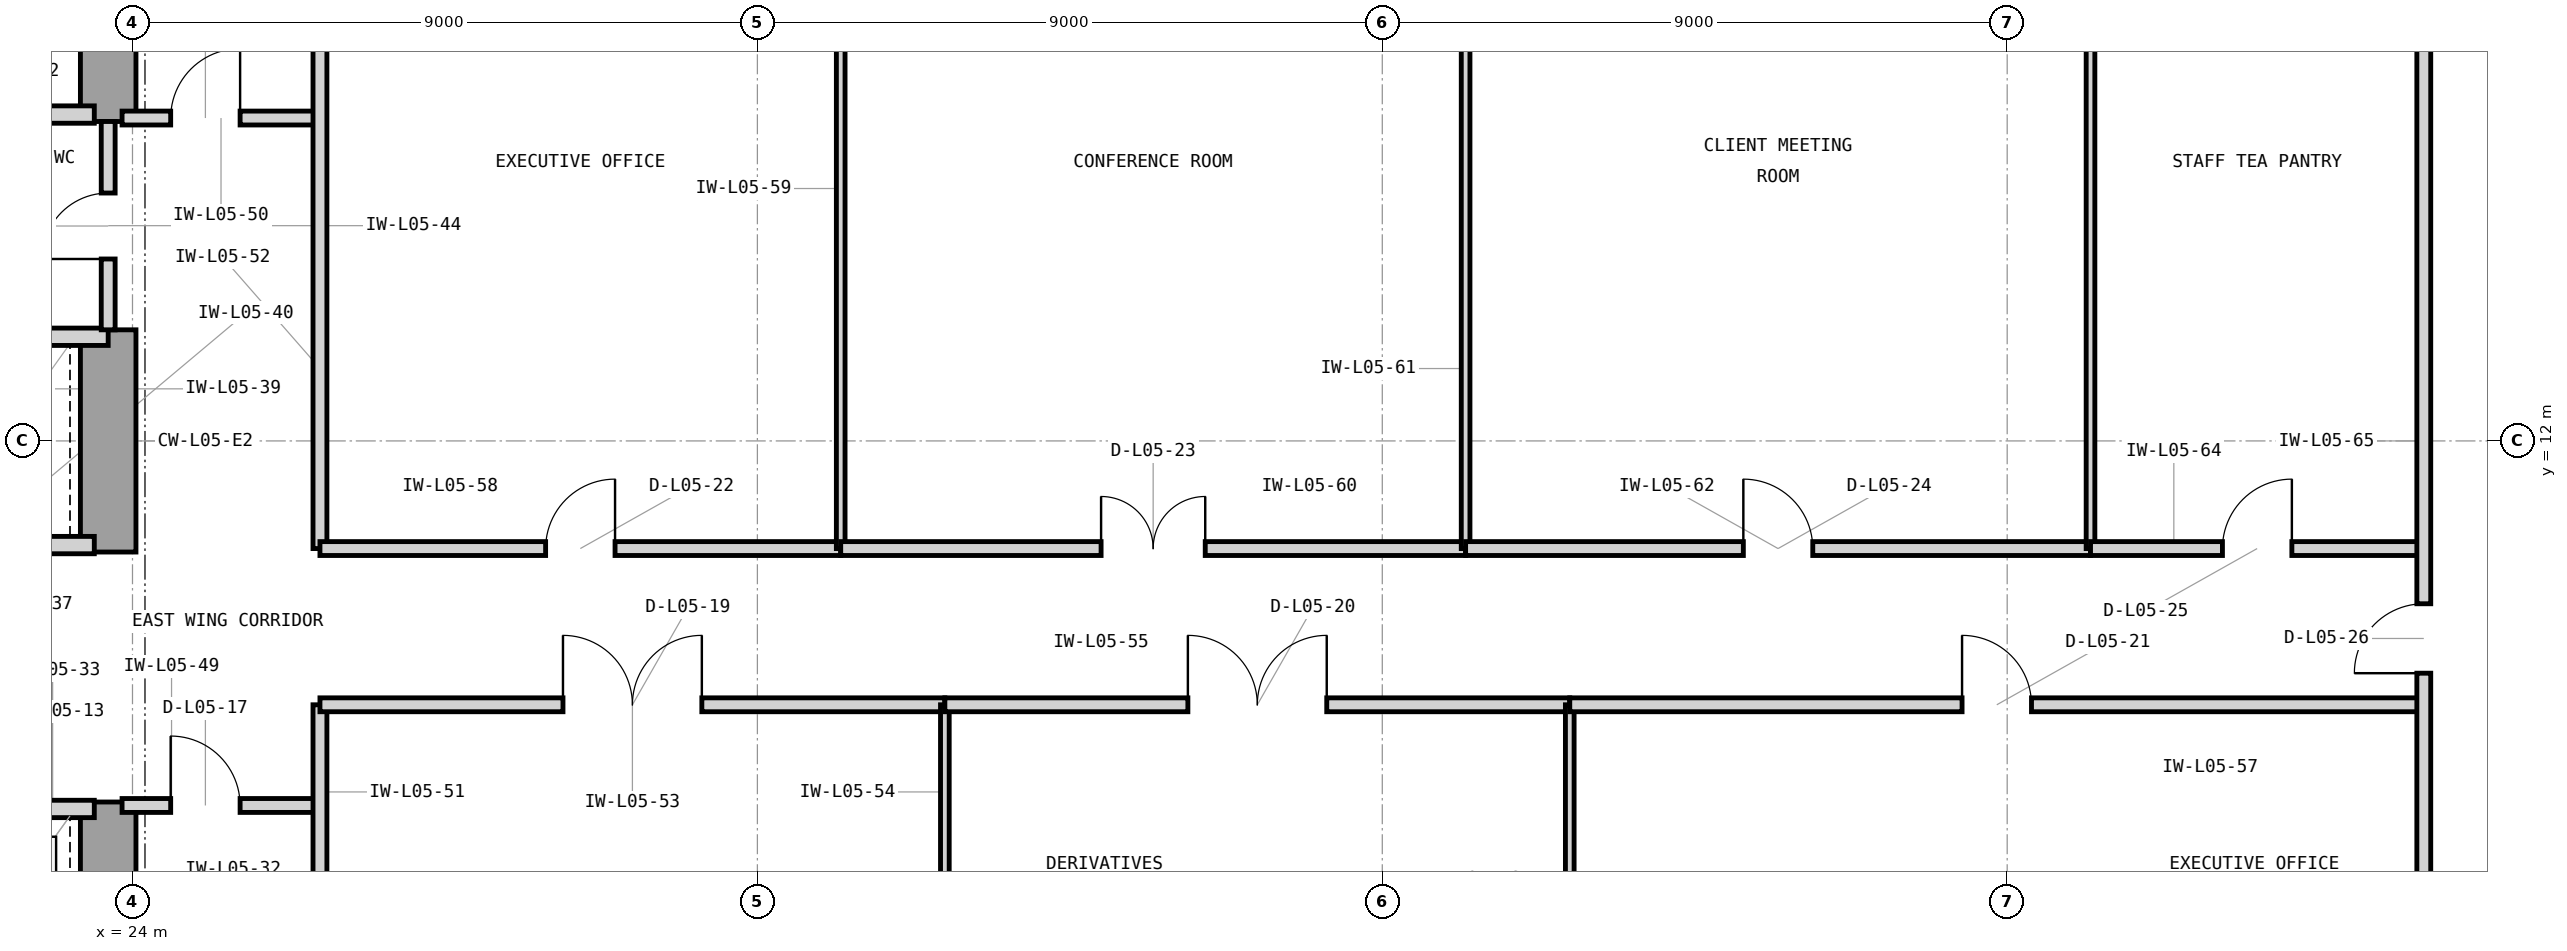
"""IFC4 building model, lengths in metres.
Left out: names, types, materials, properties, quantities, classifications, styles, units other than length and angle.
Written with IfcOpenShell. Run it as: python <this file> out.ifc"""

import sys

from ifc_helpers import new_model, si_unit, direction, frame, frame_2d, origin, place, context, subcontext, project, spatial, rectangle, extrude, element, fill, save


model = new_model("IFC4")
c1 = context("Model", 3, precision=1e-05, world=origin(), true_north=direction((0.0, 1.0)))
c2 = subcontext(c1, "Body", "Model", "MODEL_VIEW")
j1 = project(units=[si_unit("LENGTHUNIT", "METRE"), si_unit("PLANEANGLEUNIT", "RADIAN")], contexts=[c1])
p1 = place(None, origin())
s1 = spatial("IfcSite", under=j1, at=p1, CompositionType="ELEMENT")
p2 = place(p1, origin())
s2 = spatial("IfcBuilding", under=s1, at=p2, CompositionType="ELEMENT")
p3 = place(p2, frame((0.0, 0.0, 25.8)))
s3 = spatial("IfcBuildingStorey", under=s2, at=p3, CompositionType="ELEMENT", Elevation=25.8)
p4 = place(p3, frame((23.65, 3.75, 0.0), z_axis=(0.0, 0.0, 1.0), x_axis=(0.0, 1.0, 0.0)))
e1 = element("IfcWall", 1, at=p4, inside=s3, PredefinedType="SHEAR", context=c2, shape_type="SweptSolid", body=[
    extrude(rectangle(XDim=3.05, YDim=0.8, at=frame_2d((1.525, 0.0))), origin(), (0.0, 0.0, 1.0), 4.2),
])
p5 = place(p3, frame((23.65, 10.4, 0.0), z_axis=(0.0, 0.0, 1.0), x_axis=(0.0, 1.0, 0.0)))
e2 = element("IfcWall", 2, at=p5, inside=s3, PredefinedType="SHEAR", context=c2, shape_type="SweptSolid", body=[
    extrude(rectangle(XDim=3.2, YDim=0.8, at=frame_2d((1.6, 0.0))), origin(), (0.0, 0.0, 1.0), 4.2),
])
p6 = place(p3, frame((23.65, 16.6, 0.0), z_axis=(0.0, 0.0, 1.0), x_axis=(0.0, 1.0, 0.0)))
e3 = element("IfcWall", 3, at=p6, inside=s3, PredefinedType="SHEAR", context=c2, shape_type="SweptSolid", body=[
    extrude(rectangle(XDim=4.05, YDim=0.8, at=frame_2d((2.025, 0.0))), origin(), (0.0, 0.0, 1.0), 4.2),
])
p7 = place(p3, frame((21.05, 16.7, 0.0), z_axis=(0.0, 0.0, 1.0), x_axis=(1.0, 0.0, 0.0)))
e4 = element("IfcWall", 4, at=p7, inside=s3, PredefinedType="PARTITIONING", context=c2, shape_type="SweptSolid", body=[
    extrude(rectangle(XDim=2.4, YDim=0.25, at=frame_2d((1.2, 0.0))), origin(), (0.0, 0.0, 1.0), 3.426),
])
p8 = place(p3, frame((21.05, 6.7, 0.0), z_axis=(0.0, 0.0, 1.0), x_axis=(1.0, 0.0, 0.0)))
e5 = element("IfcWall", 5, at=p8, inside=s3, PredefinedType="PARTITIONING", context=c2, shape_type="SweptSolid", body=[
    extrude(rectangle(XDim=2.4, YDim=0.25, at=frame_2d((1.2, 0.0))), origin(), (0.0, 0.0, 1.0), 3.426),
])
p9 = place(p8, frame((0.48, 0.0, 0.0)))
e6 = element("IfcOpeningElement", 6, at=p9, cuts=e5, PredefinedType="OPENING", context=c2, shape_type="SweptSolid", body=[
    extrude(rectangle(XDim=1.15, YDim=2.25, at=frame_2d((0.575, 1.125))), frame((0.0, 0.135, 0.0), z_axis=(0.0, -1.0, 0.0), x_axis=(1.0, 0.0, 0.0)), (0.0, 0.0, 1.0), 0.27),
])
p10 = place(p3, frame((21.05, 10.5, 0.0), z_axis=(0.0, 0.0, 1.0), x_axis=(1.0, 0.0, 0.0)))
e7 = element("IfcWall", 7, at=p10, inside=s3, PredefinedType="PARTITIONING", context=c2, shape_type="SweptSolid", body=[
    extrude(rectangle(XDim=2.4, YDim=0.25, at=frame_2d((1.2, 0.0))), origin(), (0.0, 0.0, 1.0), 3.426),
])
p11 = place(p3, frame((14.7, 13.5, 0.0), z_axis=(0.0, 0.0, 1.0), x_axis=(1.0, 0.0, 0.0)))
e8 = element("IfcWall", 8, at=p11, inside=s3, PredefinedType="PARTITIONING", context=c2, shape_type="SweptSolid", body=[
    extrude(rectangle(XDim=8.95, YDim=0.25, at=frame_2d((4.475, 0.0))), origin(), (0.0, 0.0, 1.0), 3.426),
])
p12 = place(p3, frame((23.65, 13.6, 0.0), z_axis=(0.0, 0.0, 1.0), x_axis=(0.0, 1.0, 0.0)))
e9 = element("IfcWall", 9, at=p12, inside=s3, PredefinedType="PARTITIONING", context=c2, shape_type="SweptSolid", body=[
    extrude(rectangle(XDim=3.0, YDim=0.2, at=frame_2d((1.5, 0.0))), origin(), (0.0, 0.0, 1.0), 3.97),
])
p13 = place(p12, frame((1.02, 0.0, 0.0)))
e10 = element("IfcOpeningElement", 10, at=p13, cuts=e9, PredefinedType="OPENING", context=c2, shape_type="SweptSolid", body=[
    extrude(rectangle(XDim=0.95, YDim=2.1, at=frame_2d((0.475, 1.05))), frame((0.0, 0.11, 0.0), z_axis=(0.0, -1.0, 0.0), x_axis=(1.0, 0.0, 0.0)), (0.0, 0.0, 1.0), 0.22),
])
p14 = place(p3, frame((23.85, 6.75, 0.0), z_axis=(0.0, 0.0, 1.0), x_axis=(1.0, 0.0, 0.0)))
e11 = element("IfcWall", 11, at=p14, inside=s3, PredefinedType="PARTITIONING", context=c2, shape_type="SweptSolid", body=[
    extrude(rectangle(XDim=2.85, YDim=0.2, at=frame_2d((1.425, 0.0))), origin(), (0.0, 0.0, 1.0), 3.97),
])
p15 = place(p14, frame((0.7, 0.0, 0.0)))
e12 = element("IfcOpeningElement", 12, at=p15, cuts=e11, PredefinedType="OPENING", context=c2, shape_type="SweptSolid", body=[
    extrude(rectangle(XDim=1.0, YDim=2.15, at=frame_2d((0.5, 1.075))), frame((0.0, 0.11, 0.0), z_axis=(0.0, -1.0, 0.0), x_axis=(1.0, 0.0, 0.0)), (0.0, 0.0, 1.0), 0.22),
])
p16 = place(p3, frame((23.85, 16.65, 0.0), z_axis=(0.0, 0.0, 1.0), x_axis=(1.0, 0.0, 0.0)))
e13 = element("IfcWall", 13, at=p16, inside=s3, PredefinedType="PARTITIONING", context=c2, shape_type="SweptSolid", body=[
    extrude(rectangle(XDim=2.85, YDim=0.2, at=frame_2d((1.425, 0.0))), origin(), (0.0, 0.0, 1.0), 3.97),
])
p17 = place(p16, frame((0.7, 0.0, 0.0)))
e14 = element("IfcOpeningElement", 14, at=p17, cuts=e13, PredefinedType="OPENING", context=c2, shape_type="SweptSolid", body=[
    extrude(rectangle(XDim=1.0, YDim=2.15, at=frame_2d((0.5, 1.075))), frame((0.0, 0.11, 0.0), z_axis=(0.0, -1.0, 0.0), x_axis=(1.0, 0.0, 0.0)), (0.0, 0.0, 1.0), 0.22),
])
p18 = place(p3, frame((26.7, 3.18, 0.0), z_axis=(0.0, 0.0, 1.0), x_axis=(0.0, 1.0, 0.0)))
e15 = element("IfcWall", 15, at=p18, inside=s3, PredefinedType="PARTITIONING", context=c2, shape_type="SweptSolid", body=[
    extrude(rectangle(XDim=5.02, YDim=0.2, at=frame_2d((2.51, 0.0))), origin(), (0.0, 0.0, 1.0), 3.97),
])
p19 = place(p3, frame((26.7, 10.45, 0.0), z_axis=(0.0, 0.0, 1.0), x_axis=(0.0, 1.0, 0.0)))
e16 = element("IfcWall", 16, at=p19, inside=s3, PredefinedType="PARTITIONING", context=c2, shape_type="SweptSolid", body=[
    extrude(rectangle(XDim=10.37, YDim=0.2, at=frame_2d((5.185, 0.0))), origin(), (0.0, 0.0, 1.0), 3.97),
])
p20 = place(p3, frame((26.7, 8.2, 0.0), z_axis=(0.0, 0.0, 1.0), x_axis=(1.0, 0.0, 0.0)))
e17 = element("IfcWall", 17, at=p20, inside=s3, PredefinedType="PARTITIONING", context=c2, shape_type="SweptSolid", body=[
    extrude(rectangle(XDim=9.0, YDim=0.2, at=frame_2d((4.5, 0.0))), origin(), (0.0, 0.0, 1.0), 3.97),
])
p21 = place(p20, frame((3.5, 0.0, 0.0)))
e18 = element("IfcOpeningElement", 18, at=p21, cuts=e17, PredefinedType="OPENING", context=c2, shape_type="SweptSolid", body=[
    extrude(rectangle(XDim=2.0, YDim=2.5, at=frame_2d((1.0, 1.25))), frame((0.0, 0.11, 0.0), z_axis=(0.0, -1.0, 0.0), x_axis=(1.0, 0.0, 0.0)), (0.0, 0.0, 1.0), 0.22),
])
p22 = place(p3, frame((35.7, 3.18, 0.0), z_axis=(0.0, 0.0, 1.0), x_axis=(0.0, 1.0, 0.0)))
e19 = element("IfcWall", 19, at=p22, inside=s3, PredefinedType="PARTITIONING", context=c2, shape_type="SweptSolid", body=[
    extrude(rectangle(XDim=5.02, YDim=0.125, at=frame_2d((2.51, 0.0))), origin(), (0.0, 0.0, 1.0), 3.97),
])
p23 = place(p3, frame((35.7, 8.2, 0.0), z_axis=(0.0, 0.0, 1.0), x_axis=(1.0, 0.0, 0.0)))
e20 = element("IfcWall", 20, at=p23, inside=s3, PredefinedType="PARTITIONING", context=c2, shape_type="SweptSolid", body=[
    extrude(rectangle(XDim=9.0, YDim=0.2, at=frame_2d((4.5, 0.0))), origin(), (0.0, 0.0, 1.0), 3.97),
])
p24 = place(p23, frame((3.5, 0.0, 0.0)))
e21 = element("IfcOpeningElement", 21, at=p24, cuts=e20, PredefinedType="OPENING", context=c2, shape_type="SweptSolid", body=[
    extrude(rectangle(XDim=2.0, YDim=2.5, at=frame_2d((1.0, 1.25))), frame((0.0, 0.11, 0.0), z_axis=(0.0, -1.0, 0.0), x_axis=(1.0, 0.0, 0.0)), (0.0, 0.0, 1.0), 0.22),
])
p25 = place(p3, frame((44.7, 3.18, 0.0), z_axis=(0.0, 0.0, 1.0), x_axis=(0.0, 1.0, 0.0)))
e22 = element("IfcWall", 22, at=p25, inside=s3, PredefinedType="PARTITIONING", context=c2, shape_type="SweptSolid", body=[
    extrude(rectangle(XDim=5.02, YDim=0.125, at=frame_2d((2.51, 0.0))), origin(), (0.0, 0.0, 1.0), 3.97),
])
p26 = place(p3, frame((44.7, 8.2, 0.0), z_axis=(0.0, 0.0, 1.0), x_axis=(1.0, 0.0, 0.0)))
e23 = element("IfcWall", 23, at=p26, inside=s3, PredefinedType="PARTITIONING", context=c2, shape_type="SweptSolid", body=[
    extrude(rectangle(XDim=12.3, YDim=0.2, at=frame_2d((6.15, 0.0))), origin(), (0.0, 0.0, 1.0), 3.97),
])
p27 = place(p26, frame((5.65, 0.0, 0.0)))
e24 = element("IfcOpeningElement", 24, at=p27, cuts=e23, PredefinedType="OPENING", context=c2, shape_type="SweptSolid", body=[
    extrude(rectangle(XDim=1.0, YDim=2.15, at=frame_2d((0.5, 1.075))), frame((0.0, 0.11, 0.0), z_axis=(0.0, -1.0, 0.0), x_axis=(1.0, 0.0, 0.0)), (0.0, 0.0, 1.0), 0.22),
])
p28 = place(p3, frame((26.7, 10.45, 0.0), z_axis=(0.0, 0.0, 1.0), x_axis=(1.0, 0.0, 0.0)))
e25 = element("IfcWall", 25, at=p28, inside=s3, PredefinedType="PARTITIONING", context=c2, shape_type="SweptSolid", body=[
    extrude(rectangle(XDim=7.5, YDim=0.2, at=frame_2d((3.75, 0.0))), origin(), (0.0, 0.0, 1.0), 3.97),
])
p29 = place(p28, frame((3.25, 0.0, 0.0)))
e26 = element("IfcOpeningElement", 26, at=p29, cuts=e25, PredefinedType="OPENING", context=c2, shape_type="SweptSolid", body=[
    extrude(rectangle(XDim=1.0, YDim=2.15, at=frame_2d((0.5, 1.075))), frame((0.0, 0.11, 0.0), z_axis=(0.0, -1.0, 0.0), x_axis=(1.0, 0.0, 0.0)), (0.0, 0.0, 1.0), 0.22),
])
p30 = place(p3, frame((34.2, 10.45, 0.0), z_axis=(0.0, 0.0, 1.0), x_axis=(0.0, 1.0, 0.0)))
e27 = element("IfcWall", 27, at=p30, inside=s3, PredefinedType="PARTITIONING", context=c2, shape_type="SweptSolid", body=[
    extrude(rectangle(XDim=10.37, YDim=0.125, at=frame_2d((5.185, 0.0))), origin(), (0.0, 0.0, 1.0), 3.97),
])
p31 = place(p3, frame((34.2, 10.45, 0.0), z_axis=(0.0, 0.0, 1.0), x_axis=(1.0, 0.0, 0.0)))
e28 = element("IfcWall", 28, at=p31, inside=s3, PredefinedType="PARTITIONING", context=c2, shape_type="SweptSolid", body=[
    extrude(rectangle(XDim=9.0, YDim=0.2, at=frame_2d((4.5, 0.0))), origin(), (0.0, 0.0, 1.0), 3.97),
])
p32 = place(p31, frame((3.75, 0.0, 0.0)))
e29 = element("IfcOpeningElement", 29, at=p32, cuts=e28, PredefinedType="OPENING", context=c2, shape_type="SweptSolid", body=[
    extrude(rectangle(XDim=1.5, YDim=2.3, at=frame_2d((0.75, 1.15))), frame((0.0, 0.11, 0.0), z_axis=(0.0, -1.0, 0.0), x_axis=(1.0, 0.0, 0.0)), (0.0, 0.0, 1.0), 0.22),
])
p33 = place(p3, frame((43.2, 10.45, 0.0), z_axis=(0.0, 0.0, 1.0), x_axis=(0.0, 1.0, 0.0)))
e30 = element("IfcWall", 30, at=p33, inside=s3, PredefinedType="PARTITIONING", context=c2, shape_type="SweptSolid", body=[
    extrude(rectangle(XDim=10.37, YDim=0.125, at=frame_2d((5.185, 0.0))), origin(), (0.0, 0.0, 1.0), 3.97),
])
p34 = place(p3, frame((43.2, 10.45, 0.0), z_axis=(0.0, 0.0, 1.0), x_axis=(1.0, 0.0, 0.0)))
e31 = element("IfcWall", 31, at=p34, inside=s3, PredefinedType="PARTITIONING", context=c2, shape_type="SweptSolid", body=[
    extrude(rectangle(XDim=9.0, YDim=0.2, at=frame_2d((4.5, 0.0))), origin(), (0.0, 0.0, 1.0), 3.97),
])
p35 = place(p34, frame((4.0, 0.0, 0.0)))
e32 = element("IfcOpeningElement", 32, at=p35, cuts=e31, PredefinedType="OPENING", context=c2, shape_type="SweptSolid", body=[
    extrude(rectangle(XDim=1.0, YDim=2.15, at=frame_2d((0.5, 1.075))), frame((0.0, 0.11, 0.0), z_axis=(0.0, -1.0, 0.0), x_axis=(1.0, 0.0, 0.0)), (0.0, 0.0, 1.0), 0.22),
])
p36 = place(p3, frame((52.2, 10.45, 0.0), z_axis=(0.0, 0.0, 1.0), x_axis=(0.0, 1.0, 0.0)))
e33 = element("IfcWall", 33, at=p36, inside=s3, PredefinedType="PARTITIONING", context=c2, shape_type="SweptSolid", body=[
    extrude(rectangle(XDim=10.37, YDim=0.125, at=frame_2d((5.185, 0.0))), origin(), (0.0, 0.0, 1.0), 3.97),
])
p37 = place(p3, frame((52.2, 10.45, 0.0), z_axis=(0.0, 0.0, 1.0), x_axis=(1.0, 0.0, 0.0)))
e34 = element("IfcWall", 34, at=p37, inside=s3, PredefinedType="PARTITIONING", context=c2, shape_type="SweptSolid", body=[
    extrude(rectangle(XDim=4.8, YDim=0.2, at=frame_2d((2.4, 0.0))), origin(), (0.0, 0.0, 1.0), 3.97),
])
p38 = place(p37, frame((1.9, 0.0, 0.0)))
e35 = element("IfcOpeningElement", 35, at=p38, cuts=e34, PredefinedType="OPENING", context=c2, shape_type="SweptSolid", body=[
    extrude(rectangle(XDim=1.0, YDim=2.15, at=frame_2d((0.5, 1.075))), frame((0.0, 0.11, 0.0), z_axis=(0.0, -1.0, 0.0), x_axis=(1.0, 0.0, 0.0)), (0.0, 0.0, 1.0), 0.22),
])
p39 = place(p3, frame((57.0, 3.18, 0.0), z_axis=(0.0, 0.0, 1.0), x_axis=(0.0, 1.0, 0.0)))
e36 = element("IfcWall", 36, at=p39, inside=s3, PredefinedType="PARTITIONING", context=c2, shape_type="SweptSolid", body=[
    extrude(rectangle(XDim=17.64, YDim=0.2, at=frame_2d((8.82, 0.0))), origin(), (0.0, 0.0, 1.0), 3.114),
])
p40 = place(p39, frame((5.475, 0.0, 0.0)))
e37 = element("IfcOpeningElement", 37, at=p40, cuts=e36, PredefinedType="OPENING", context=c2, shape_type="SweptSolid", body=[
    extrude(rectangle(XDim=1.0, YDim=2.15, at=frame_2d((0.5, 1.075))), frame((0.0, 0.11, 0.0), z_axis=(0.0, -1.0, 0.0), x_axis=(1.0, 0.0, 0.0)), (0.0, 0.0, 1.0), 0.22),
])
p41 = place(p13, origin())
e38 = element("IfcDoor", 38, at=p41, inside=s3, OperationType="SINGLE_SWING_LEFT", PredefinedType="DOOR", context=c2, shape_type="SweptSolid", body=[
    extrude(rectangle(XDim=0.95, YDim=2.1, at=frame_2d((0.475, 1.05))), frame((0.0, 0.025, 0.0), z_axis=(0.0, -1.0, 0.0), x_axis=(1.0, 0.0, 0.0)), (0.0, 0.0, 1.0), 0.05),
])
fill(e10, e38)
p42 = place(p15, origin())
e39 = element("IfcDoor", 39, at=p42, inside=s3, OperationType="SINGLE_SWING_LEFT", PredefinedType="DOOR", context=c2, shape_type="SweptSolid", body=[
    extrude(rectangle(XDim=1.0, YDim=2.15, at=frame_2d((0.5, 1.075))), frame((0.0, 0.025, 0.0), z_axis=(0.0, -1.0, 0.0), x_axis=(1.0, 0.0, 0.0)), (0.0, 0.0, 1.0), 0.05),
])
fill(e12, e39)
p43 = place(p17, origin())
e40 = element("IfcDoor", 40, at=p43, inside=s3, OperationType="SINGLE_SWING_RIGHT", PredefinedType="DOOR", context=c2, shape_type="SweptSolid", body=[
    extrude(rectangle(XDim=1.0, YDim=2.15, at=frame_2d((0.5, 1.075))), frame((0.0, 0.025, 0.0), z_axis=(0.0, -1.0, 0.0), x_axis=(1.0, 0.0, 0.0)), (0.0, 0.0, 1.0), 0.05),
])
fill(e14, e40)
p44 = place(p21, origin())
e41 = element("IfcDoor", 41, at=p44, inside=s3, OperationType="DOUBLE_DOOR_SINGLE_SWING", PredefinedType="DOOR", context=c2, shape_type="SweptSolid", body=[
    extrude(rectangle(XDim=2.0, YDim=2.5, at=frame_2d((1.0, 1.25))), frame((0.0, 0.025, 0.0), z_axis=(0.0, -1.0, 0.0), x_axis=(1.0, 0.0, 0.0)), (0.0, 0.0, 1.0), 0.05),
])
fill(e18, e41)
p45 = place(p24, origin())
e42 = element("IfcDoor", 42, at=p45, inside=s3, OperationType="DOUBLE_DOOR_SINGLE_SWING", PredefinedType="DOOR", context=c2, shape_type="SweptSolid", body=[
    extrude(rectangle(XDim=2.0, YDim=2.5, at=frame_2d((1.0, 1.25))), frame((0.0, 0.025, 0.0), z_axis=(0.0, -1.0, 0.0), x_axis=(1.0, 0.0, 0.0)), (0.0, 0.0, 1.0), 0.05),
])
fill(e21, e42)
p46 = place(p27, origin())
e43 = element("IfcDoor", 43, at=p46, inside=s3, OperationType="SINGLE_SWING_LEFT", PredefinedType="DOOR", context=c2, shape_type="SweptSolid", body=[
    extrude(rectangle(XDim=1.0, YDim=2.15, at=frame_2d((0.5, 1.075))), frame((0.0, 0.025, 0.0), z_axis=(0.0, -1.0, 0.0), x_axis=(1.0, 0.0, 0.0)), (0.0, 0.0, 1.0), 0.05),
])
fill(e24, e43)
p47 = place(p29, origin())
e44 = element("IfcDoor", 44, at=p47, inside=s3, OperationType="SINGLE_SWING_RIGHT", PredefinedType="DOOR", context=c2, shape_type="SweptSolid", body=[
    extrude(rectangle(XDim=1.0, YDim=2.15, at=frame_2d((0.5, 1.075))), frame((0.0, 0.025, 0.0), z_axis=(0.0, -1.0, 0.0), x_axis=(1.0, 0.0, 0.0)), (0.0, 0.0, 1.0), 0.05),
])
fill(e26, e44)
p48 = place(p32, origin())
e45 = element("IfcDoor", 45, at=p48, inside=s3, OperationType="DOUBLE_DOOR_SINGLE_SWING", PredefinedType="DOOR", context=c2, shape_type="SweptSolid", body=[
    extrude(rectangle(XDim=1.5, YDim=2.3, at=frame_2d((0.75, 1.15))), frame((0.0, 0.025, 0.0), z_axis=(0.0, -1.0, 0.0), x_axis=(1.0, 0.0, 0.0)), (0.0, 0.0, 1.0), 0.05),
])
fill(e29, e45)
p49 = place(p35, origin())
e46 = element("IfcDoor", 46, at=p49, inside=s3, OperationType="SINGLE_SWING_LEFT", PredefinedType="DOOR", context=c2, shape_type="SweptSolid", body=[
    extrude(rectangle(XDim=1.0, YDim=2.15, at=frame_2d((0.5, 1.075))), frame((0.0, 0.025, 0.0), z_axis=(0.0, -1.0, 0.0), x_axis=(1.0, 0.0, 0.0)), (0.0, 0.0, 1.0), 0.05),
])
fill(e32, e46)
p50 = place(p38, origin())
e47 = element("IfcDoor", 47, at=p50, inside=s3, OperationType="SINGLE_SWING_RIGHT", PredefinedType="DOOR", context=c2, shape_type="SweptSolid", body=[
    extrude(rectangle(XDim=1.0, YDim=2.15, at=frame_2d((0.5, 1.075))), frame((0.0, 0.025, 0.0), z_axis=(0.0, -1.0, 0.0), x_axis=(1.0, 0.0, 0.0)), (0.0, 0.0, 1.0), 0.05),
])
fill(e35, e47)
p51 = place(p40, origin())
e48 = element("IfcDoor", 48, at=p51, inside=s3, OperationType="SINGLE_SWING_LEFT", PredefinedType="DOOR", context=c2, shape_type="SweptSolid", body=[
    extrude(rectangle(XDim=1.0, YDim=2.15, at=frame_2d((0.5, 1.075))), frame((0.0, 0.025, 0.0), z_axis=(0.0, -1.0, 0.0), x_axis=(1.0, 0.0, 0.0)), (0.0, 0.0, 1.0), 0.05),
])
fill(e37, e48)
save(model, sys.argv[1])
